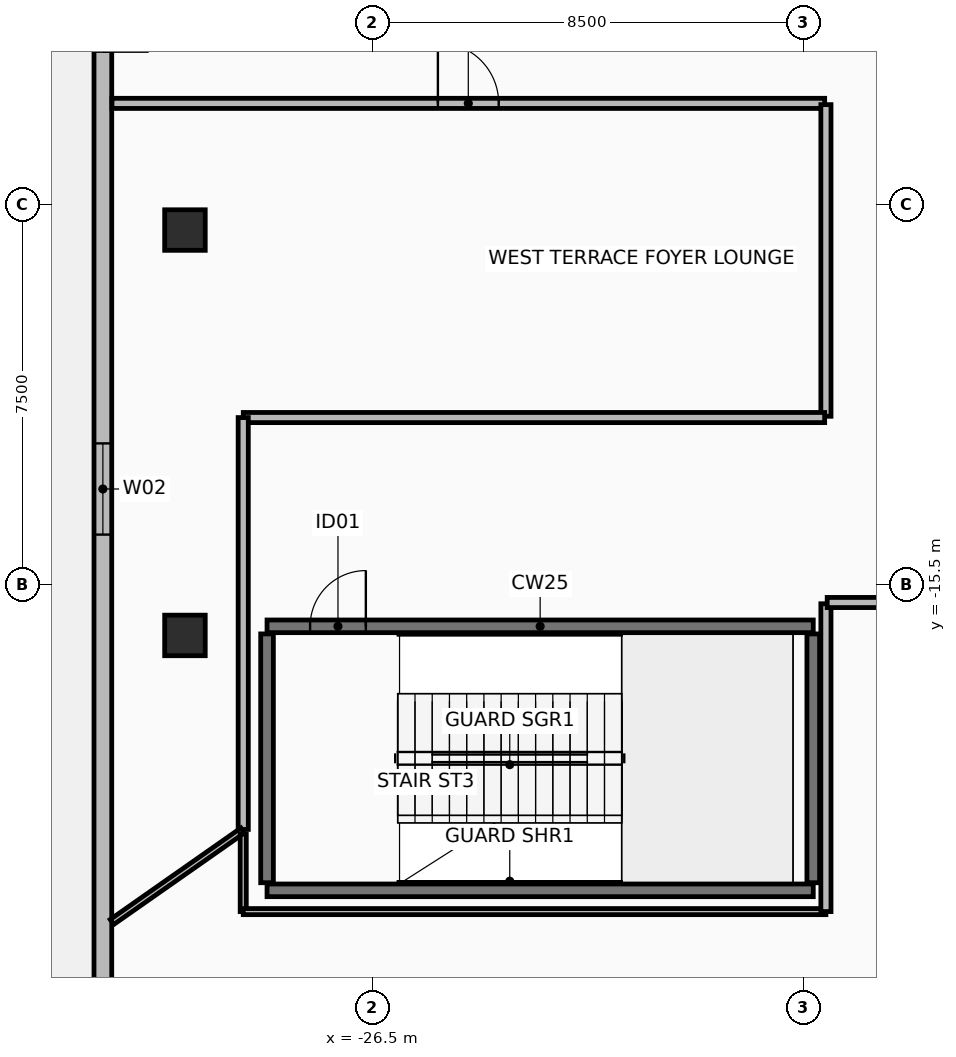
"""IFC4 building model, lengths in metres.
Left out: names, types, materials, properties, quantities, classifications, styles, units other than length and angle.
Written with IfcOpenShell. Run it as: python <this file> out.ifc"""

import sys

from ifc_helpers import new_model, si_unit, direction, frame, frame_2d, origin, origin_2d, place, context, subcontext, project, spatial, rectangle, hollow_rectangle, extrude, element, fill, save


model = new_model("IFC4")
c1 = context("Model", 3, precision=1e-05, world=origin(), true_north=direction((0.0, 1.0)))
c2 = subcontext(c1, "Body", "Model", "MODEL_VIEW")
j1 = project(units=[si_unit("LENGTHUNIT", "METRE"), si_unit("PLANEANGLEUNIT", "RADIAN")], contexts=[c1])
p1 = place(None, origin())
s1 = spatial("IfcSite", under=j1, at=p1, CompositionType="ELEMENT")
p2 = place(p1, origin())
s2 = spatial("IfcBuilding", under=s1, at=p2, CompositionType="ELEMENT")
p3 = place(p2, frame((0.0, 0.0, 16.5)))
s3 = spatial("IfcBuildingStorey", under=s2, at=p3, CompositionType="ELEMENT", Elevation=16.5)
for number, where, z_axis, x_axis in (
    (1, (-30.2, -16.5, 0.0), (0.0, 0.0, 1.0), (1.0, 0.0, 0.0)),
    (2, (-30.2, -8.5, 0.0), (0.0, 0.0, 1.0), (1.0, 0.0, 0.0)),
):
    element("IfcColumn", number, at=place(p3, frame(where, z_axis=z_axis, x_axis=x_axis)), inside=s3, PredefinedType="COLUMN", context=c2, shape_type="SweptSolid", body=[
        extrude(hollow_rectangle(XDim=0.8, YDim=0.8, WallThickness=0.045, at=origin_2d()), origin(), (0.0, 0.0, 1.0), 5.0),
    ])
p4 = place(p3, frame((-31.82, 26.62, 0.0), z_axis=(0.0, 0.0, 1.0), x_axis=(0.0, -1.0, 0.0)))
e3 = element("IfcWall", 3, at=p4, inside=s3, PredefinedType="STANDARD", context=c2, shape_type="SweptSolid", body=[
    extrude(rectangle(XDim=53.64, YDim=0.35, at=frame_2d((26.82, 0.0))), origin(), (0.0, 0.0, 1.0), 4.74),
])
p5 = place(p4, frame((29.8, 0.0, 0.0)))
e4 = element("IfcOpeningElement", 4, at=p5, cuts=e3, PredefinedType="OPENING", context=c2, shape_type="SweptSolid", body=[
    extrude(rectangle(XDim=1.8, YDim=2.3, at=frame_2d((0.9, 1.15))), frame((0.0, 0.185, 0.0), z_axis=(0.0, -1.0, 0.0), x_axis=(1.0, 0.0, 0.0)), (0.0, 0.0, 1.0), 0.37),
])
p6 = place(p4, frame((12.51, 0.0, 0.95)))
e5 = element("IfcOpeningElement", 5, at=p6, cuts=e3, PredefinedType="OPENING", context=c2, shape_type="SweptSolid", body=[
    extrude(rectangle(XDim=1.8, YDim=2.2, at=frame_2d((0.9, 1.1))), frame((0.0, 0.185, 0.0), z_axis=(0.0, -1.0, 0.0), x_axis=(1.0, 0.0, 0.0)), (0.0, 0.0, 1.0), 0.37),
])
p7 = place(p4, frame((25.92, 0.0, 0.95)))
e6 = element("IfcOpeningElement", 6, at=p7, cuts=e3, PredefinedType="OPENING", context=c2, shape_type="SweptSolid", body=[
    extrude(rectangle(XDim=1.8, YDim=2.2, at=frame_2d((0.9, 1.1))), frame((0.0, 0.185, 0.0), z_axis=(0.0, -1.0, 0.0), x_axis=(1.0, 0.0, 0.0)), (0.0, 0.0, 1.0), 0.37),
])
p8 = place(p4, frame((39.33, 0.0, 0.95)))
e7 = element("IfcOpeningElement", 7, at=p8, cuts=e3, PredefinedType="OPENING", context=c2, shape_type="SweptSolid", body=[
    extrude(rectangle(XDim=1.8, YDim=2.2, at=frame_2d((0.9, 1.1))), frame((0.0, 0.185, 0.0), z_axis=(0.0, -1.0, 0.0), x_axis=(1.0, 0.0, 0.0)), (0.0, 0.0, 1.0), 0.37),
])
p9 = place(p3, frame((-28.58, -16.32, 0.0), z_axis=(0.0, 0.0, 1.0), x_axis=(1.0, 0.0, 0.0)))
e8 = element("IfcWall", 8, at=p9, inside=s3, PredefinedType="SHEAR", context=c2, shape_type="SweptSolid", body=[
    extrude(rectangle(XDim=10.78, YDim=0.25, at=frame_2d((5.39, 0.0))), origin(), (0.0, 0.0, 1.0), 4.74),
])
p10 = place(p9, frame((0.85, 0.0, 0.0)))
e9 = element("IfcOpeningElement", 9, at=p10, cuts=e8, PredefinedType="OPENING", context=c2, shape_type="SweptSolid", body=[
    extrude(rectangle(XDim=1.1, YDim=2.15, at=frame_2d((0.55, 1.075))), frame((0.0, 0.135, 0.0), z_axis=(0.0, -1.0, 0.0), x_axis=(1.0, 0.0, 0.0)), (0.0, 0.0, 1.0), 0.27),
])
p11 = place(p3, frame((-28.58, -21.53, 0.0), z_axis=(0.0, 0.0, 1.0), x_axis=(1.0, 0.0, 0.0)))
e10 = element("IfcWall", 10, at=p11, inside=s3, PredefinedType="SHEAR", context=c2, shape_type="SweptSolid", body=[
    extrude(rectangle(XDim=10.78, YDim=0.25, at=frame_2d((5.39, 0.0))), origin(), (0.0, 0.0, 1.0), 4.74),
])
for number, where, z_axis, x_axis in (
    (11, (-28.58, -21.38, 0.0), (0.0, 0.0, 1.0), (0.0, 1.0, 0.0)),
    (12, (-17.8, -21.38, 0.0), (0.0, 0.0, 1.0), (0.0, 1.0, 0.0)),
):
    element("IfcWall", number, at=place(p3, frame(where, z_axis=z_axis, x_axis=x_axis)), inside=s3, PredefinedType="SHEAR", context=c2, shape_type="SweptSolid", body=[
        extrude(rectangle(XDim=4.91, YDim=0.25, at=frame_2d((2.455, 0.0))), origin(), (0.0, 0.0, 1.0), 4.74),
    ])
p12 = place(p3, frame((-31.64, -6.0, 0.0), z_axis=(0.0, 0.0, 1.0), x_axis=(1.0, 0.0, 0.0)))
e13 = element("IfcWall", 13, at=p12, inside=s3, PredefinedType="PARTITIONING", context=c2, shape_type="SweptSolid", body=[
    extrude(rectangle(XDim=14.065, YDim=0.2, at=frame_2d((7.032, 0.0))), origin(), (0.0, 0.0, 1.0), 3.935),
])
p13 = place(p12, frame((6.432, 0.0, 0.0)))
e14 = element("IfcOpeningElement", 14, at=p13, cuts=e13, PredefinedType="OPENING", context=c2, shape_type="SweptSolid", body=[
    extrude(rectangle(XDim=1.2, YDim=2.15, at=frame_2d((0.6, 1.075))), frame((0.0, 0.11, 0.0), z_axis=(0.0, -1.0, 0.0), x_axis=(1.0, 0.0, 0.0)), (0.0, 0.0, 1.0), 0.22),
])
p14 = place(p3, frame((-17.55, -6.025, 0.0), z_axis=(0.0, 0.0, 1.0), x_axis=(0.0, -1.0, 0.0)))
e15 = element("IfcWall", 15, at=p14, inside=s3, PredefinedType="PARTITIONING", context=c2, shape_type="SweptSolid", body=[
    extrude(rectangle(XDim=6.15, YDim=0.2, at=frame_2d((3.075, 0.0))), origin(), (0.0, 0.0, 1.0), 3.135),
])
p15 = place(p3, frame((-17.575, -12.2, 0.0), z_axis=(0.0, 0.0, 1.0), x_axis=(-1.0, 0.0, 0.0)))
e16 = element("IfcWall", 16, at=p15, inside=s3, PredefinedType="PARTITIONING", context=c2, shape_type="SweptSolid", body=[
    extrude(rectangle(XDim=11.474, YDim=0.2, at=frame_2d((5.737, 0.0))), origin(), (0.0, 0.0, 1.0), 4.74),
])
p16 = place(p3, frame((-29.05, -12.201, 0.0), z_axis=(0.0, 0.0, 1.0), x_axis=(0.0, -1.0, 0.0)))
e17 = element("IfcWall", 17, at=p16, inside=s3, PredefinedType="PARTITIONING", context=c2, shape_type="SweptSolid", body=[
    extrude(rectangle(XDim=8.127, YDim=0.2, at=frame_2d((4.063, 0.0))), origin(), (0.0, 0.0, 1.0), 4.285),
])
p17 = place(p3, frame((-29.061, -20.348, 0.0), z_axis=(0.0, 0.0, 1.0), x_axis=(-0.819115335844, -0.573628857873, 0.0)))
e18 = element("IfcWall", 18, at=p17, inside=s3, PredefinedType="PARTITIONING", context=c2, shape_type="SweptSolid", body=[
    extrude(rectangle(XDim=3.149, YDim=0.12, at=frame_2d((1.574, 0.0))), origin(), (0.0, 0.0, 1.0), 3.935),
])
p18 = place(p3, frame((-29.05, -20.42, 0.0), z_axis=(0.0, 0.0, 1.0), x_axis=(0.0, -1.0, 0.0)))
e19 = element("IfcWall", 19, at=p18, inside=s3, PredefinedType="PARTITIONING", context=c2, shape_type="SweptSolid", body=[
    extrude(rectangle(XDim=1.529, YDim=0.12, at=frame_2d((0.765, 0.0))), origin(), (0.0, 0.0, 1.0), 4.74),
])
p19 = place(p3, frame((-29.049, -21.95, 0.0), z_axis=(0.0, 0.0, 1.0), x_axis=(1.0, 0.0, 0.0)))
e20 = element("IfcWall", 20, at=p19, inside=s3, PredefinedType="PARTITIONING", context=c2, shape_type="SweptSolid", body=[
    extrude(rectangle(XDim=11.499, YDim=0.12, at=frame_2d((5.75, 0.0))), origin(), (0.0, 0.0, 1.0), 4.74),
])
p20 = place(p3, frame((-17.55, -21.949, 0.0), z_axis=(0.0, 0.0, 1.0), x_axis=(0.0, 1.0, 0.0)))
e21 = element("IfcWall", 21, at=p20, inside=s3, PredefinedType="PARTITIONING", context=c2, shape_type="SweptSolid", body=[
    extrude(rectangle(XDim=6.074, YDim=0.2, at=frame_2d((3.037, 0.0))), origin(), (0.0, 0.0, 1.0), 4.74),
])
p21 = place(p3, frame((-17.525, -15.85, 0.0), z_axis=(0.0, 0.0, 1.0), x_axis=(1.0, 0.0, 0.0)))
e22 = element("IfcWall", 22, at=p21, inside=s3, PredefinedType="PARTITIONING", context=c2, shape_type="SweptSolid", body=[
    extrude(rectangle(XDim=24.9, YDim=0.2, at=frame_2d((12.45, 0.0))), origin(), (0.0, 0.0, 1.0), 2.935),
])
p22 = place(p21, frame((11.95, 0.0, 0.0)))
e23 = element("IfcOpeningElement", 23, at=p22, cuts=e22, PredefinedType="OPENING", context=c2, shape_type="SweptSolid", body=[
    extrude(rectangle(XDim=1.0, YDim=2.15, at=frame_2d((0.5, 1.075))), frame((0.0, 0.11, 0.0), z_axis=(0.0, -1.0, 0.0), x_axis=(1.0, 0.0, 0.0)), (0.0, 0.0, 1.0), 0.22),
])
p23 = place(p8, origin())
e24 = element("IfcWindow", 24, at=p23, inside=s3, PartitioningType="SINGLE_PANEL", PredefinedType="WINDOW", context=c2, shape_type="SweptSolid", body=[
    extrude(rectangle(XDim=1.8, YDim=2.2, at=frame_2d((0.9, 1.1))), frame((0.0, 0.03, 0.0), z_axis=(0.0, -1.0, 0.0), x_axis=(1.0, 0.0, 0.0)), (0.0, 0.0, 1.0), 0.06),
])
fill(e7, e24)
p24 = place(p10, frame((1.1, 0.0, 0.0), z_axis=(0.0, 0.0, 1.0), x_axis=(-1.0, 0.0, 0.0)))
e25 = element("IfcDoor", 25, at=p24, inside=s3, OperationType="SINGLE_SWING_LEFT", PredefinedType="DOOR", context=c2, shape_type="SweptSolid", body=[
    extrude(rectangle(XDim=1.1, YDim=2.15, at=frame_2d((0.55, 1.075))), frame((0.0, 0.025, 0.0), z_axis=(0.0, -1.0, 0.0), x_axis=(1.0, 0.0, 0.0)), (0.0, 0.0, 1.0), 0.05),
])
fill(e9, e25)
p25 = place(p13, origin())
e26 = element("IfcDoor", 26, at=p25, inside=s3, OperationType="SINGLE_SWING_LEFT", PredefinedType="DOOR", context=c2, shape_type="SweptSolid", body=[
    extrude(rectangle(XDim=1.2, YDim=2.15, at=frame_2d((0.6, 1.075))), frame((0.0, 0.025, 0.0), z_axis=(0.0, -1.0, 0.0), x_axis=(1.0, 0.0, 0.0)), (0.0, 0.0, 1.0), 0.05),
])
fill(e14, e26)
save(model, sys.argv[1])
